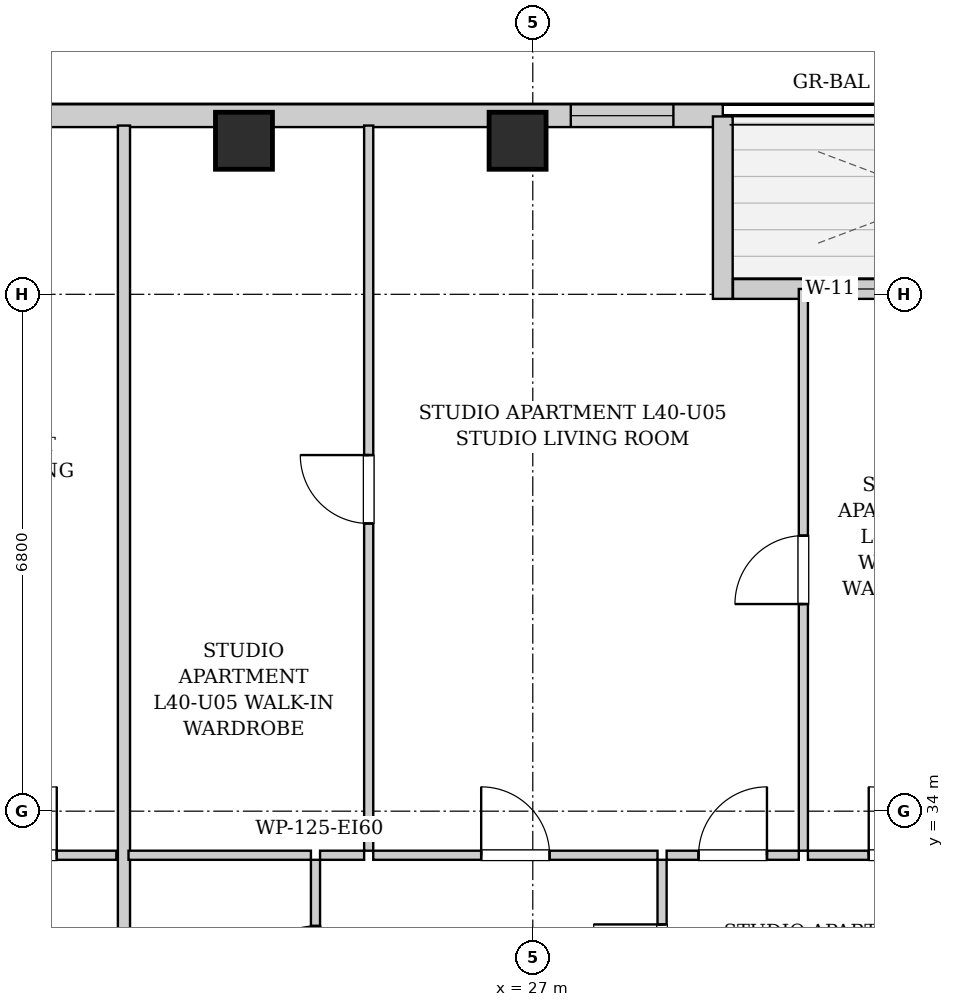
"""IFC4 building model, lengths in metres.
Left out: names, types, materials, properties, quantities, classifications, styles, units other than length and angle.
Written with IfcOpenShell. Run it as: python <this file> out.ifc"""

import sys

from ifc_helpers import new_model, si_unit, direction, frame, frame_2d, origin, origin_2d, place, context, subcontext, project, spatial, rectangle, extrude, element, fill, save


model = new_model("IFC4")
c1 = context("Model", 3, precision=1e-05, world=origin(), true_north=direction((0.0, 1.0)))
c2 = subcontext(c1, "Body", "Model", "MODEL_VIEW")
j1 = project(units=[si_unit("LENGTHUNIT", "METRE"), si_unit("PLANEANGLEUNIT", "RADIAN")], contexts=[c1])
p1 = place(None, origin())
s1 = spatial("IfcSite", under=j1, at=p1, CompositionType="ELEMENT")
p2 = place(p1, origin())
s2 = spatial("IfcBuilding", under=s1, at=p2, CompositionType="ELEMENT")
p3 = place(p2, frame((0.0, 0.0, 140.65)))
s3 = spatial("IfcBuildingStorey", under=s2, at=p3, CompositionType="ELEMENT", Elevation=140.65)
for number, where, z_axis, x_axis in (
    (1, (23.2, 42.82, 0.0), (0.0, 0.0, 1.0), (1.0, 0.0, 0.0)),
    (2, (26.8, 42.82, 0.0), (0.0, 0.0, 1.0), (1.0, 0.0, 0.0)),
):
    element("IfcColumn", number, at=place(p3, frame(where, z_axis=z_axis, x_axis=x_axis)), inside=s3, PredefinedType="COLUMN", context=c2, shape_type="SweptSolid", body=[
        extrude(rectangle(XDim=0.75, YDim=0.75, at=origin_2d()), origin(), (0.0, 0.0, 1.0), 3.25),
    ])
p4 = place(p3, frame((10.0, 43.15, 0.0), z_axis=(0.0, 0.0, 1.0), x_axis=(1.0, 0.0, 0.0)))
e3 = element("IfcWall", 3, at=p4, inside=s3, PredefinedType="SOLIDWALL", context=c2, shape_type="SweptSolid", body=[
    extrude(rectangle(XDim=19.5, YDim=0.3, at=frame_2d((9.75, 0.0))), origin(), (0.0, 0.0, 1.0), 2.99),
])
p5 = place(p4, frame((2.315, 0.0, 0.55)))
e4 = element("IfcOpeningElement", 4, at=p5, cuts=e3, PredefinedType="OPENING", context=c2, shape_type="SweptSolid", body=[
    extrude(rectangle(XDim=1.35, YDim=1.2, at=frame_2d((0.675, 0.6))), frame((0.0, 0.16, 0.0), z_axis=(0.0, -1.0, 0.0), x_axis=(1.0, 0.0, 0.0)), (0.0, 0.0, 1.0), 0.32),
])
p6 = place(p4, frame((4.735, 0.0, 0.55)))
e5 = element("IfcOpeningElement", 5, at=p6, cuts=e3, PredefinedType="OPENING", context=c2, shape_type="SweptSolid", body=[
    extrude(rectangle(XDim=1.35, YDim=1.2, at=frame_2d((0.675, 0.6))), frame((0.0, 0.16, 0.0), z_axis=(0.0, -1.0, 0.0), x_axis=(1.0, 0.0, 0.0)), (0.0, 0.0, 1.0), 0.32),
])
p7 = place(p4, frame((8.625, 0.0, 0.55)))
e6 = element("IfcOpeningElement", 6, at=p7, cuts=e3, PredefinedType="OPENING", context=c2, shape_type="SweptSolid", body=[
    extrude(rectangle(XDim=1.35, YDim=1.2, at=frame_2d((0.675, 0.6))), frame((0.0, 0.16, 0.0), z_axis=(0.0, -1.0, 0.0), x_axis=(1.0, 0.0, 0.0)), (0.0, 0.0, 1.0), 0.32),
])
p8 = place(p4, frame((17.5, 0.0, 0.55)))
e7 = element("IfcOpeningElement", 7, at=p8, cuts=e3, PredefinedType="OPENING", context=c2, shape_type="SweptSolid", body=[
    extrude(rectangle(XDim=1.35, YDim=1.2, at=frame_2d((0.675, 0.6))), frame((0.0, 0.16, 0.0), z_axis=(0.0, -1.0, 0.0), x_axis=(1.0, 0.0, 0.0)), (0.0, 0.0, 1.0), 0.32),
])
p9 = place(p3, frame((29.5, 43.14, 0.0), z_axis=(0.0, 0.0, 1.0), x_axis=(0.0, -1.0, 0.0)))
e8 = element("IfcWall", 8, at=p9, inside=s3, PredefinedType="SOLIDWALL", context=c2, shape_type="SweptSolid", body=[
    extrude(rectangle(XDim=2.4, YDim=0.26, at=frame_2d((1.2, 0.0))), origin(), (0.0, 0.0, 1.0), 2.99),
])
p10 = place(p3, frame((29.634, 40.87, 0.0), z_axis=(0.0, 0.0, 1.0), x_axis=(1.0, 0.0, 0.0)))
e9 = element("IfcWall", 9, at=p10, inside=s3, PredefinedType="SOLIDWALL", context=c2, shape_type="SweptSolid", body=[
    extrude(rectangle(XDim=5.432, YDim=0.26, at=frame_2d((2.716, 0.0))), origin(), (0.0, 0.0, 1.0), 2.99),
])
p11 = place(p10, frame((2.166, 0.0, 0.0)))
e10 = element("IfcOpeningElement", 10, at=p11, cuts=e9, PredefinedType="OPENING", context=c2, shape_type="SweptSolid", body=[
    extrude(rectangle(XDim=1.1, YDim=2.0, at=frame_2d((0.55, 1.0))), frame((0.0, 0.14, 0.0), z_axis=(0.0, -1.0, 0.0), x_axis=(1.0, 0.0, 0.0)), (0.0, 0.0, 1.0), 0.28),
])
p12 = place(p10, frame((1.156, 0.0, 0.55)))
e11 = element("IfcOpeningElement", 11, at=p12, cuts=e9, PredefinedType="OPENING", context=c2, shape_type="SweptSolid", body=[
    extrude(rectangle(XDim=0.85, YDim=1.2, at=frame_2d((0.425, 0.6))), frame((0.0, 0.14, 0.0), z_axis=(0.0, -1.0, 0.0), x_axis=(1.0, 0.0, 0.0)), (0.0, 0.0, 1.0), 0.28),
])
p13 = place(p3, frame((19.054, 33.42, 0.0), z_axis=(0.0, 0.0, 1.0), x_axis=(1.0, 0.0, 0.0)))
e12 = element("IfcWall", 12, at=p13, inside=s3, PredefinedType="PARTITIONING", context=c2, shape_type="SweptSolid", body=[
    extrude(rectangle(XDim=2.467, YDim=0.12, at=frame_2d((1.233, 0.0))), origin(), (0.0, 0.0, 1.0), 2.99),
])
p14 = place(p13, frame((0.783, 0.0, 0.0)))
e13 = element("IfcOpeningElement", 13, at=p14, cuts=e12, PredefinedType="OPENING", context=c2, shape_type="SweptSolid", body=[
    extrude(rectangle(XDim=0.9, YDim=2.05, at=frame_2d((0.45, 1.025))), frame((0.0, 0.07, 0.0), z_axis=(0.0, -1.0, 0.0), x_axis=(1.0, 0.0, 0.0)), (0.0, 0.0, 1.0), 0.14),
])
p15 = place(p3, frame((21.621, 30.76, 0.0), z_axis=(0.0, 0.0, 1.0), x_axis=(0.0, 1.0, 0.0)))
e14 = element("IfcWall", 14, at=p15, inside=s3, PredefinedType="PARTITIONING", context=c2, shape_type="SweptSolid", body=[
    extrude(rectangle(XDim=12.26, YDim=0.16, at=frame_2d((6.13, 0.0))), origin(), (0.0, 0.0, 1.0), 2.99),
])
p16 = place(p3, frame((24.141, 30.76, 0.0), z_axis=(0.0, 0.0, 1.0), x_axis=(0.0, 1.0, 0.0)))
e15 = element("IfcWall", 15, at=p16, inside=s3, PredefinedType="PARTITIONING", context=c2, shape_type="SweptSolid", body=[
    extrude(rectangle(XDim=2.6, YDim=0.12, at=frame_2d((1.3, 0.0))), origin(), (0.0, 0.0, 1.0), 2.99),
])
p17 = place(p16, frame((0.87, 0.0, 0.0)))
e16 = element("IfcOpeningElement", 16, at=p17, cuts=e15, PredefinedType="OPENING", context=c2, shape_type="SweptSolid", body=[
    extrude(rectangle(XDim=0.86, YDim=2.05, at=frame_2d((0.43, 1.025))), frame((0.0, 0.07, 0.0), z_axis=(0.0, -1.0, 0.0), x_axis=(1.0, 0.0, 0.0)), (0.0, 0.0, 1.0), 0.14),
])
p18 = place(p3, frame((21.681, 33.42, 0.0), z_axis=(0.0, 0.0, 1.0), x_axis=(1.0, 0.0, 0.0)))
e17 = element("IfcWall", 17, at=p18, inside=s3, PredefinedType="PARTITIONING", context=c2, shape_type="SweptSolid", body=[
    extrude(rectangle(XDim=2.4, YDim=0.12, at=frame_2d((1.2, 0.0))), origin(), (0.0, 0.0, 1.0), 2.99),
])
p19 = place(p3, frame((28.701, 30.76, 0.0), z_axis=(0.0, 0.0, 1.0), x_axis=(0.0, 1.0, 0.0)))
e18 = element("IfcWall", 18, at=p19, inside=s3, PredefinedType="PARTITIONING", context=c2, shape_type="SweptSolid", body=[
    extrude(rectangle(XDim=2.6, YDim=0.12, at=frame_2d((1.3, 0.0))), origin(), (0.0, 0.0, 1.0), 2.99),
])
p20 = place(p19, frame((0.85, 0.0, 0.0)))
e19 = element("IfcOpeningElement", 19, at=p20, cuts=e18, PredefinedType="OPENING", context=c2, shape_type="SweptSolid", body=[
    extrude(rectangle(XDim=0.9, YDim=2.05, at=frame_2d((0.45, 1.025))), frame((0.0, 0.07, 0.0), z_axis=(0.0, -1.0, 0.0), x_axis=(1.0, 0.0, 0.0)), (0.0, 0.0, 1.0), 0.14),
])
p21 = place(p3, frame((24.201, 33.42, 0.0), z_axis=(0.0, 0.0, 1.0), x_axis=(1.0, 0.0, 0.0)))
e20 = element("IfcWall", 20, at=p21, inside=s3, PredefinedType="PARTITIONING", context=c2, shape_type="SweptSolid", body=[
    extrude(rectangle(XDim=0.58, YDim=0.12, at=frame_2d((0.29, 0.0))), origin(), (0.0, 0.0, 1.0), 2.99),
])
p22 = place(p3, frame((24.901, 33.42, 0.0), z_axis=(0.0, 0.0, 1.0), x_axis=(1.0, 0.0, 0.0)))
e21 = element("IfcWall", 21, at=p22, inside=s3, PredefinedType="PARTITIONING", context=c2, shape_type="SweptSolid", body=[
    extrude(rectangle(XDim=3.74, YDim=0.12, at=frame_2d((1.87, 0.0))), origin(), (0.0, 0.0, 1.0), 2.99),
])
p23 = place(p22, frame((1.42, 0.0, 0.0)))
e22 = element("IfcOpeningElement", 22, at=p23, cuts=e21, PredefinedType="OPENING", context=c2, shape_type="SweptSolid", body=[
    extrude(rectangle(XDim=0.9, YDim=2.05, at=frame_2d((0.45, 1.025))), frame((0.0, 0.07, 0.0), z_axis=(0.0, -1.0, 0.0), x_axis=(1.0, 0.0, 0.0)), (0.0, 0.0, 1.0), 0.14),
])
p24 = place(p3, frame((28.761, 33.42, 0.0), z_axis=(0.0, 0.0, 1.0), x_axis=(1.0, 0.0, 0.0)))
e23 = element("IfcWall", 23, at=p24, inside=s3, PredefinedType="PARTITIONING", context=c2, shape_type="SweptSolid", body=[
    extrude(rectangle(XDim=1.739, YDim=0.12, at=frame_2d((0.87, 0.0))), origin(), (0.0, 0.0, 1.0), 2.99),
])
p25 = place(p24, frame((0.42, 0.0, 0.0)))
e24 = element("IfcOpeningElement", 24, at=p25, cuts=e23, PredefinedType="OPENING", context=c2, shape_type="SweptSolid", body=[
    extrude(rectangle(XDim=0.9, YDim=2.05, at=frame_2d((0.45, 1.025))), frame((0.0, 0.07, 0.0), z_axis=(0.0, -1.0, 0.0), x_axis=(1.0, 0.0, 0.0)), (0.0, 0.0, 1.0), 0.14),
])
p26 = place(p3, frame((30.62, 33.42, 0.0), z_axis=(0.0, 0.0, 1.0), x_axis=(1.0, 0.0, 0.0)))
e25 = element("IfcWall", 25, at=p26, inside=s3, PredefinedType="PARTITIONING", context=c2, shape_type="SweptSolid", body=[
    extrude(rectangle(XDim=2.5, YDim=0.12, at=frame_2d((1.25, 0.0))), origin(), (0.0, 0.0, 1.0), 2.99),
])
p27 = place(p26, frame((0.8, 0.0, 0.0)))
e26 = element("IfcOpeningElement", 26, at=p27, cuts=e25, PredefinedType="OPENING", context=c2, shape_type="SweptSolid", body=[
    extrude(rectangle(XDim=0.9, YDim=2.05, at=frame_2d((0.45, 1.025))), frame((0.0, 0.07, 0.0), z_axis=(0.0, -1.0, 0.0), x_axis=(1.0, 0.0, 0.0)), (0.0, 0.0, 1.0), 0.14),
])
p28 = place(p3, frame((24.841, 33.48, 0.0), z_axis=(0.0, 0.0, 1.0), x_axis=(0.0, 1.0, 0.0)))
e27 = element("IfcWall", 27, at=p28, inside=s3, PredefinedType="PARTITIONING", context=c2, shape_type="SweptSolid", body=[
    extrude(rectangle(XDim=9.54, YDim=0.12, at=frame_2d((4.77, 0.0))), origin(), (0.0, 0.0, 1.0), 2.99),
])
p29 = place(p28, frame((4.305, 0.0, 0.0)))
e28 = element("IfcOpeningElement", 28, at=p29, cuts=e27, PredefinedType="OPENING", context=c2, shape_type="SweptSolid", body=[
    extrude(rectangle(XDim=0.9, YDim=2.05, at=frame_2d((0.45, 1.025))), frame((0.0, 0.07, 0.0), z_axis=(0.0, -1.0, 0.0), x_axis=(1.0, 0.0, 0.0)), (0.0, 0.0, 1.0), 0.14),
])
p30 = place(p3, frame((30.56, 33.48, 0.0), z_axis=(0.0, 0.0, 1.0), x_axis=(0.0, 1.0, 0.0)))
e29 = element("IfcWall", 29, at=p30, inside=s3, PredefinedType="PARTITIONING", context=c2, shape_type="SweptSolid", body=[
    extrude(rectangle(XDim=7.39, YDim=0.12, at=frame_2d((3.695, 0.0))), origin(), (0.0, 0.0, 1.0), 2.99),
])
p31 = place(p30, frame((3.245, 0.0, 0.0)))
e30 = element("IfcOpeningElement", 30, at=p31, cuts=e29, PredefinedType="OPENING", context=c2, shape_type="SweptSolid", body=[
    extrude(rectangle(XDim=0.9, YDim=2.05, at=frame_2d((0.45, 1.025))), frame((0.0, 0.07, 0.0), z_axis=(0.0, -1.0, 0.0), x_axis=(1.0, 0.0, 0.0)), (0.0, 0.0, 1.0), 0.14),
])
p32 = place(p14, origin())
e31 = element("IfcDoor", 31, at=p32, inside=s3, OperationType="SINGLE_SWING_RIGHT", PredefinedType="DOOR", context=c2, shape_type="SweptSolid", body=[
    extrude(rectangle(XDim=0.9, YDim=2.05, at=frame_2d((0.45, 1.025))), frame((0.0, 0.025, 0.0), z_axis=(0.0, -1.0, 0.0), x_axis=(1.0, 0.0, 0.0)), (0.0, 0.0, 1.0), 0.05),
])
fill(e13, e31)
p33 = place(p17, origin())
e32 = element("IfcDoor", 32, at=p33, inside=s3, OperationType="SINGLE_SWING_LEFT", PredefinedType="DOOR", context=c2, shape_type="SweptSolid", body=[
    extrude(rectangle(XDim=0.86, YDim=2.05, at=frame_2d((0.43, 1.025))), frame((0.0, 0.025, 0.0), z_axis=(0.0, -1.0, 0.0), x_axis=(1.0, 0.0, 0.0)), (0.0, 0.0, 1.0), 0.05),
])
fill(e16, e32)
p34 = place(p20, origin())
e33 = element("IfcDoor", 33, at=p34, inside=s3, OperationType="SINGLE_SWING_RIGHT", PredefinedType="DOOR", context=c2, shape_type="SweptSolid", body=[
    extrude(rectangle(XDim=0.9, YDim=2.05, at=frame_2d((0.45, 1.025))), frame((0.0, 0.025, 0.0), z_axis=(0.0, -1.0, 0.0), x_axis=(1.0, 0.0, 0.0)), (0.0, 0.0, 1.0), 0.05),
])
fill(e19, e33)
p35 = place(p23, origin())
e34 = element("IfcDoor", 34, at=p35, inside=s3, OperationType="SINGLE_SWING_LEFT", PredefinedType="DOOR", context=c2, shape_type="SweptSolid", body=[
    extrude(rectangle(XDim=0.9, YDim=2.05, at=frame_2d((0.45, 1.025))), frame((0.0, 0.025, 0.0), z_axis=(0.0, -1.0, 0.0), x_axis=(1.0, 0.0, 0.0)), (0.0, 0.0, 1.0), 0.05),
])
fill(e22, e34)
p36 = place(p25, origin())
e35 = element("IfcDoor", 35, at=p36, inside=s3, OperationType="SINGLE_SWING_RIGHT", PredefinedType="DOOR", context=c2, shape_type="SweptSolid", body=[
    extrude(rectangle(XDim=0.9, YDim=2.05, at=frame_2d((0.45, 1.025))), frame((0.0, 0.025, 0.0), z_axis=(0.0, -1.0, 0.0), x_axis=(1.0, 0.0, 0.0)), (0.0, 0.0, 1.0), 0.05),
])
fill(e24, e35)
p37 = place(p27, origin())
e36 = element("IfcDoor", 36, at=p37, inside=s3, OperationType="SINGLE_SWING_LEFT", PredefinedType="DOOR", context=c2, shape_type="SweptSolid", body=[
    extrude(rectangle(XDim=0.9, YDim=2.05, at=frame_2d((0.45, 1.025))), frame((0.0, 0.025, 0.0), z_axis=(0.0, -1.0, 0.0), x_axis=(1.0, 0.0, 0.0)), (0.0, 0.0, 1.0), 0.05),
])
fill(e26, e36)
p38 = place(p29, origin())
e37 = element("IfcDoor", 37, at=p38, inside=s3, OperationType="SINGLE_SWING_RIGHT", PredefinedType="DOOR", context=c2, shape_type="SweptSolid", body=[
    extrude(rectangle(XDim=0.9, YDim=2.05, at=frame_2d((0.45, 1.025))), frame((0.0, 0.025, 0.0), z_axis=(0.0, -1.0, 0.0), x_axis=(1.0, 0.0, 0.0)), (0.0, 0.0, 1.0), 0.05),
])
fill(e28, e37)
p39 = place(p31, origin())
e38 = element("IfcDoor", 38, at=p39, inside=s3, OperationType="SINGLE_SWING_LEFT", PredefinedType="DOOR", context=c2, shape_type="SweptSolid", body=[
    extrude(rectangle(XDim=0.9, YDim=2.05, at=frame_2d((0.45, 1.025))), frame((0.0, 0.025, 0.0), z_axis=(0.0, -1.0, 0.0), x_axis=(1.0, 0.0, 0.0)), (0.0, 0.0, 1.0), 0.05),
])
fill(e30, e38)
p40 = place(p8, origin())
e39 = element("IfcWindow", 39, at=p40, inside=s3, PartitioningType="SINGLE_PANEL", PredefinedType="WINDOW", context=c2, shape_type="SweptSolid", body=[
    extrude(rectangle(XDim=1.35, YDim=1.2, at=frame_2d((0.675, 0.6))), frame((0.0, 0.03, 0.0), z_axis=(0.0, -1.0, 0.0), x_axis=(1.0, 0.0, 0.0)), (0.0, 0.0, 1.0), 0.06),
])
fill(e7, e39)
p41 = place(p12, origin())
e40 = element("IfcWindow", 40, at=p41, inside=s3, PartitioningType="SINGLE_PANEL", PredefinedType="WINDOW", context=c2, shape_type="SweptSolid", body=[
    extrude(rectangle(XDim=0.85, YDim=1.2, at=frame_2d((0.425, 0.6))), frame((0.0, 0.03, 0.0), z_axis=(0.0, -1.0, 0.0), x_axis=(1.0, 0.0, 0.0)), (0.0, 0.0, 1.0), 0.06),
])
fill(e11, e40)
save(model, sys.argv[1])
